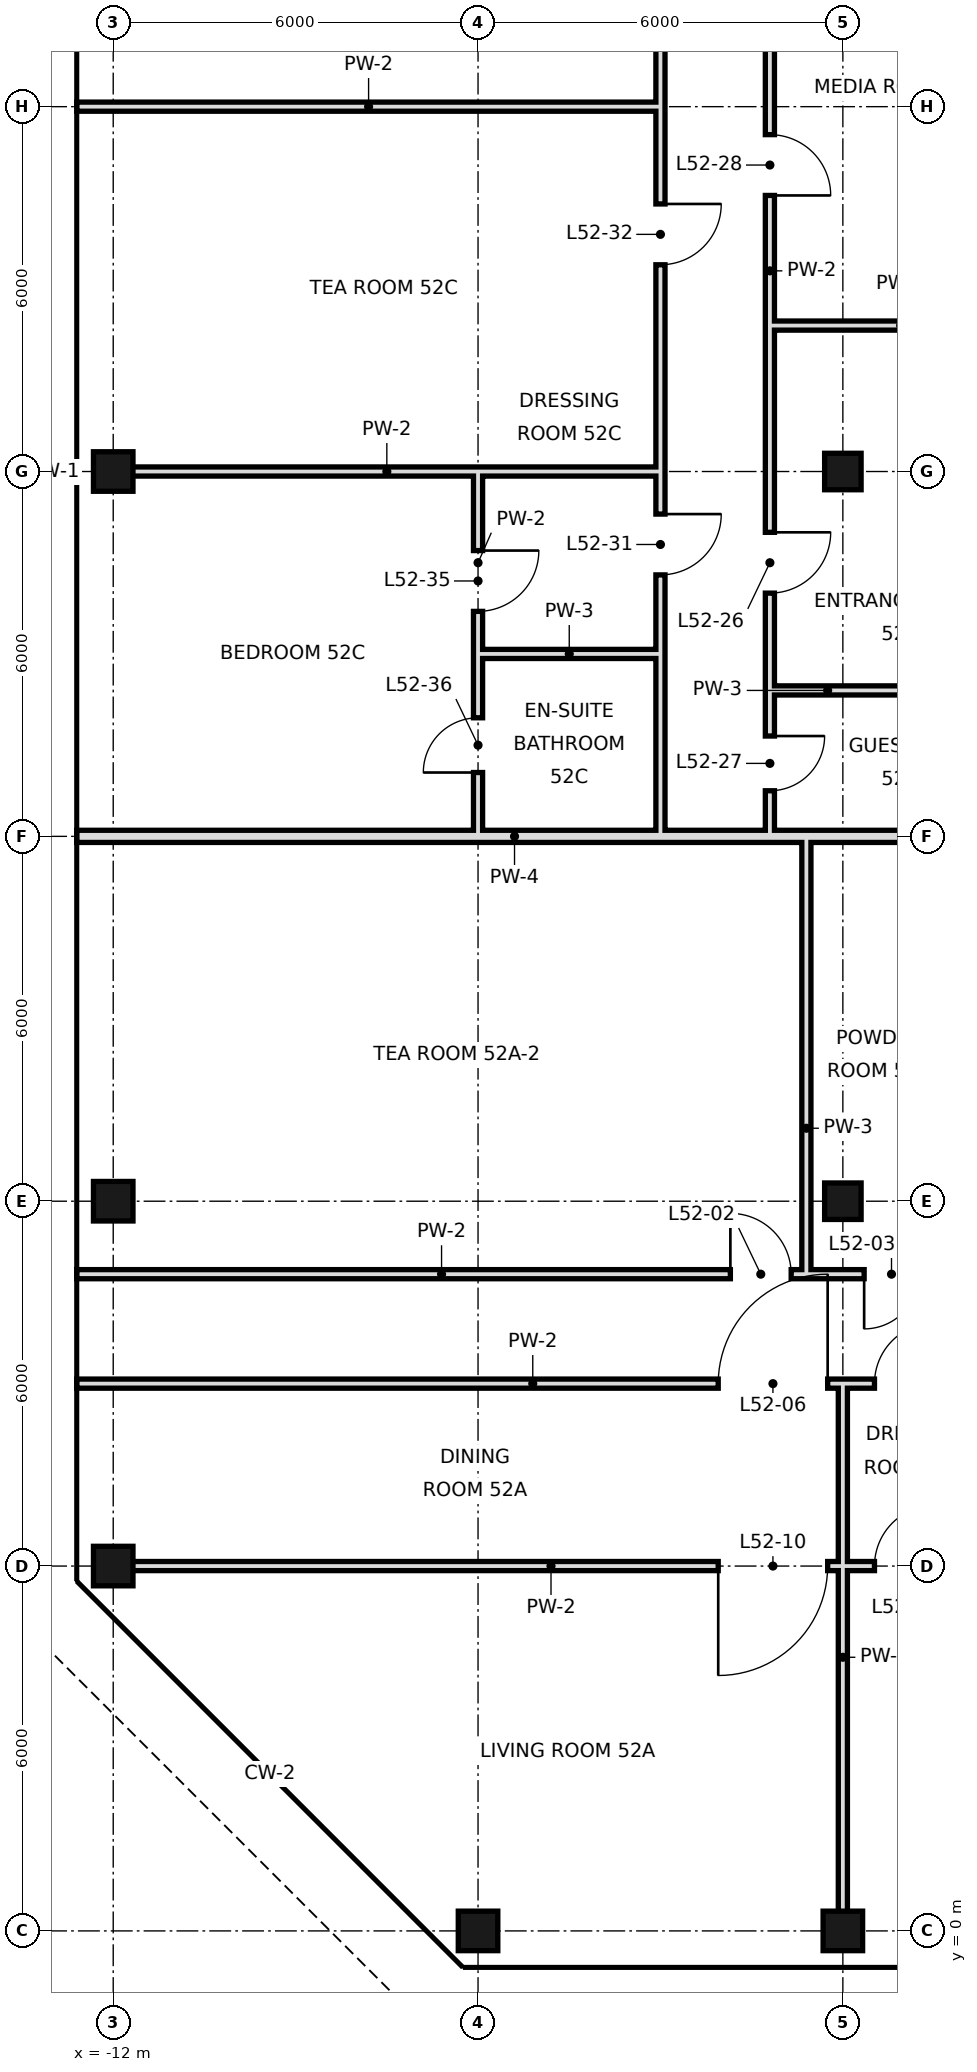
"""IFC4 building model, lengths in metres.
Left out: names, types, materials, properties, quantities, classifications, styles, units other than length and angle.
Written with IfcOpenShell. Run it as: python <this file> out.ifc"""

import sys

from ifc_helpers import new_model, si_unit, direction, frame, frame_2d, origin, origin_2d, place, context, subcontext, project, spatial, rectangle, hollow_rectangle, extrude, element, fill, save


model = new_model("IFC4")
c1 = context("Model", 3, precision=1e-05, world=origin(), true_north=direction((0.0, 1.0)))
c2 = subcontext(c1, "Body", "Model", "MODEL_VIEW")
j1 = project(units=[si_unit("LENGTHUNIT", "METRE"), si_unit("PLANEANGLEUNIT", "RADIAN")], contexts=[c1])
p1 = place(None, origin())
s1 = spatial("IfcSite", under=j1, at=p1, CompositionType="ELEMENT")
p2 = place(p1, origin())
s2 = spatial("IfcBuilding", under=s1, at=p2, CompositionType="ELEMENT")
p3 = place(p2, frame((0.0, 0.0, 222.6)))
s3 = spatial("IfcBuildingStorey", under=s2, at=p3, CompositionType="ELEMENT", Elevation=222.6)
for number, where, z_axis, x_axis in (
    (1, (-12.0, 6.0, 0.0), (0.0, 0.0, 1.0), (1.0, 0.0, 0.0)),
    (2, (-12.0, 12.0, 0.0), (0.0, 0.0, 1.0), (1.0, 0.0, 0.0)),
    (3, (-12.0, 24.0, 0.0), (0.0, 0.0, 1.0), (1.0, 0.0, 0.0)),
    (4, (-6.0, 0.0, 0.0), (0.0, 0.0, 1.0), (1.0, 0.0, 0.0)),
    (5, (0.0, 0.0, 0.0), (0.0, 0.0, 1.0), (1.0, 0.0, 0.0)),
):
    element("IfcColumn", number, at=place(p3, frame(where, z_axis=z_axis, x_axis=x_axis)), inside=s3, PredefinedType="COLUMN", context=c2, shape_type="SweptSolid", body=[
        extrude(hollow_rectangle(XDim=0.65, YDim=0.65, WallThickness=0.032, at=origin_2d()), origin(), (0.0, 0.0, 1.0), 3.6),
    ])
for number, where, z_axis, x_axis in (
    (6, (0.0, 12.0, 0.0), (0.0, 0.0, 1.0), (1.0, 0.0, 0.0)),
    (7, (0.0, 24.0, 0.0), (0.0, 0.0, 1.0), (1.0, 0.0, 0.0)),
):
    element("IfcColumn", number, at=place(p3, frame(where, z_axis=z_axis, x_axis=x_axis)), inside=s3, PredefinedType="COLUMN", context=c2, shape_type="SweptSolid", body=[
        extrude(hollow_rectangle(XDim=0.6, YDim=0.6, WallThickness=0.028, at=origin_2d()), origin(), (0.0, 0.0, 1.0), 3.6),
    ])
p4 = place(p3, frame((-0.6, 10.8, 0.0), z_axis=(0.0, 0.0, 1.0), x_axis=(0.0, 1.0, 0.0)))
e8 = element("IfcWall", 8, at=p4, inside=s3, PredefinedType="PARTITIONING", context=c2, shape_type="SweptSolid", body=[
    extrude(rectangle(XDim=7.2, YDim=0.15, at=frame_2d((3.6, 0.0))), origin(), (0.0, 0.0, 1.0), 3.42),
])
p5 = place(p3, frame((-1.2, 20.4, 0.0), z_axis=(0.0, 0.0, 1.0), x_axis=(0.0, 1.0, 0.0)))
e9 = element("IfcWall", 9, at=p5, inside=s3, PredefinedType="PARTITIONING", context=c2, shape_type="SweptSolid", body=[
    extrude(rectangle(XDim=13.8, YDim=0.15, at=frame_2d((6.9, 0.0))), origin(), (0.0, 0.0, 1.0), 3.42),
])
p6 = place(p5, frame((1.6, 0.0, 0.0)))
e10 = element("IfcOpeningElement", 10, at=p6, cuts=e9, PredefinedType="OPENING", context=c2, shape_type="SweptSolid", body=[
    extrude(rectangle(XDim=1.0, YDim=2.4, at=frame_2d((0.5, 1.2))), frame((0.0, 0.085, 0.0), z_axis=(0.0, -1.0, 0.0), x_axis=(1.0, 0.0, 0.0)), (0.0, 0.0, 1.0), 0.17),
])
p7 = place(p5, frame((8.14, 0.0, 0.0)))
e11 = element("IfcOpeningElement", 11, at=p7, cuts=e9, PredefinedType="OPENING", context=c2, shape_type="SweptSolid", body=[
    extrude(rectangle(XDim=1.0, YDim=2.4, at=frame_2d((0.5, 1.2))), frame((0.0, 0.085, 0.0), z_axis=(0.0, -1.0, 0.0), x_axis=(1.0, 0.0, 0.0)), (0.0, 0.0, 1.0), 0.17),
])
p8 = place(p3, frame((-1.2, 18.0, 0.0), z_axis=(0.0, 0.0, 1.0), x_axis=(0.0, 1.0, 0.0)))
e12 = element("IfcWall", 12, at=p8, inside=s3, PredefinedType="PARTITIONING", context=c2, shape_type="SweptSolid", body=[
    extrude(rectangle(XDim=2.4, YDim=0.15, at=frame_2d((1.2, 0.0))), origin(), (0.0, 0.0, 1.0), 3.42),
])
p9 = place(p8, frame((0.75, 0.0, 0.0)))
e13 = element("IfcOpeningElement", 13, at=p9, cuts=e12, PredefinedType="OPENING", context=c2, shape_type="SweptSolid", body=[
    extrude(rectangle(XDim=0.9, YDim=2.4, at=frame_2d((0.45, 1.2))), frame((0.0, 0.085, 0.0), z_axis=(0.0, -1.0, 0.0), x_axis=(1.0, 0.0, 0.0)), (0.0, 0.0, 1.0), 0.17),
])
p10 = place(p3, frame((-3.0, 21.0, 0.0), z_axis=(0.0, 0.0, 1.0), x_axis=(0.0, 1.0, 0.0)))
e14 = element("IfcWall", 14, at=p10, inside=s3, PredefinedType="PARTITIONING", context=c2, shape_type="SweptSolid", body=[
    extrude(rectangle(XDim=27.6, YDim=0.15, at=frame_2d((13.8, 0.0))), origin(), (0.0, 0.0, 1.0), 3.42),
])
p11 = place(p10, frame((1.3, 0.0, 0.0)))
e15 = element("IfcOpeningElement", 15, at=p11, cuts=e14, PredefinedType="OPENING", context=c2, shape_type="SweptSolid", body=[
    extrude(rectangle(XDim=1.0, YDim=2.4, at=frame_2d((0.5, 1.2))), frame((0.0, 0.085, 0.0), z_axis=(0.0, -1.0, 0.0), x_axis=(1.0, 0.0, 0.0)), (0.0, 0.0, 1.0), 0.17),
])
p12 = place(p10, frame((6.4, 0.0, 0.0)))
e16 = element("IfcOpeningElement", 16, at=p12, cuts=e14, PredefinedType="OPENING", context=c2, shape_type="SweptSolid", body=[
    extrude(rectangle(XDim=1.0, YDim=2.4, at=frame_2d((0.5, 1.2))), frame((0.0, 0.085, 0.0), z_axis=(0.0, -1.0, 0.0), x_axis=(1.0, 0.0, 0.0)), (0.0, 0.0, 1.0), 0.17),
])
p13 = place(p10, frame((12.4, 0.0, 0.0)))
e17 = element("IfcOpeningElement", 17, at=p13, cuts=e14, PredefinedType="OPENING", context=c2, shape_type="SweptSolid", body=[
    extrude(rectangle(XDim=1.0, YDim=2.4, at=frame_2d((0.5, 1.2))), frame((0.0, 0.085, 0.0), z_axis=(0.0, -1.0, 0.0), x_axis=(1.0, 0.0, 0.0)), (0.0, 0.0, 1.0), 0.17),
])
p14 = place(p10, frame((20.1, 0.0, 0.0)))
e18 = element("IfcOpeningElement", 18, at=p14, cuts=e14, PredefinedType="OPENING", context=c2, shape_type="SweptSolid", body=[
    extrude(rectangle(XDim=1.8, YDim=2.4, at=frame_2d((0.9, 1.2))), frame((0.0, 0.085, 0.0), z_axis=(0.0, -1.0, 0.0), x_axis=(1.0, 0.0, 0.0)), (0.0, 0.0, 1.0), 0.17),
])
p15 = place(p3, frame((-3.0, 18.0, 0.0), z_axis=(0.0, 0.0, 1.0), x_axis=(0.0, 1.0, 0.0)))
e19 = element("IfcWall", 19, at=p15, inside=s3, PredefinedType="PARTITIONING", context=c2, shape_type="SweptSolid", body=[
    extrude(rectangle(XDim=3.0, YDim=0.15, at=frame_2d((1.5, 0.0))), origin(), (0.0, 0.0, 1.0), 3.42),
])
p16 = place(p3, frame((-6.0, 21.0, 0.0), z_axis=(0.0, 0.0, 1.0), x_axis=(0.0, 1.0, 0.0)))
e20 = element("IfcWall", 20, at=p16, inside=s3, PredefinedType="PARTITIONING", context=c2, shape_type="SweptSolid", body=[
    extrude(rectangle(XDim=3.0, YDim=0.15, at=frame_2d((1.5, 0.0))), origin(), (0.0, 0.0, 1.0), 3.42),
])
p17 = place(p16, frame((0.7, 0.0, 0.0)))
e21 = element("IfcOpeningElement", 21, at=p17, cuts=e20, PredefinedType="OPENING", context=c2, shape_type="SweptSolid", body=[
    extrude(rectangle(XDim=1.0, YDim=2.4, at=frame_2d((0.5, 1.2))), frame((0.0, 0.085, 0.0), z_axis=(0.0, -1.0, 0.0), x_axis=(1.0, 0.0, 0.0)), (0.0, 0.0, 1.0), 0.17),
])
p18 = place(p3, frame((-6.0, 18.0, 0.0), z_axis=(0.0, 0.0, 1.0), x_axis=(0.0, 1.0, 0.0)))
e22 = element("IfcWall", 22, at=p18, inside=s3, PredefinedType="PARTITIONING", context=c2, shape_type="SweptSolid", body=[
    extrude(rectangle(XDim=3.0, YDim=0.15, at=frame_2d((1.5, 0.0))), origin(), (0.0, 0.0, 1.0), 3.42),
])
p19 = place(p18, frame((1.05, 0.0, 0.0)))
e23 = element("IfcOpeningElement", 23, at=p19, cuts=e22, PredefinedType="OPENING", context=c2, shape_type="SweptSolid", body=[
    extrude(rectangle(XDim=0.9, YDim=2.4, at=frame_2d((0.45, 1.2))), frame((0.0, 0.085, 0.0), z_axis=(0.0, -1.0, 0.0), x_axis=(1.0, 0.0, 0.0)), (0.0, 0.0, 1.0), 0.17),
])
p20 = place(p3, frame((0.0, 0.0, 0.0), z_axis=(0.0, 0.0, 1.0), x_axis=(0.0, 1.0, 0.0)))
e24 = element("IfcWall", 24, at=p20, inside=s3, PredefinedType="PARTITIONING", context=c2, shape_type="SweptSolid", body=[
    extrude(rectangle(XDim=9.0, YDim=0.15, at=frame_2d((4.5, 0.0))), origin(), (0.0, 0.0, 1.0), 2.72),
])
p21 = place(p3, frame((-12.6, 10.8, 0.0), z_axis=(0.0, 0.0, 1.0), x_axis=(1.0, 0.0, 0.0)))
e25 = element("IfcWall", 25, at=p21, inside=s3, PredefinedType="PARTITIONING", context=c2, shape_type="SweptSolid", body=[
    extrude(rectangle(XDim=12.0, YDim=0.15, at=frame_2d((6.0, 0.0))), origin(), (0.0, 0.0, 1.0), 3.42),
])
p22 = place(p21, frame((10.75, 0.0, 0.0)))
e26 = element("IfcOpeningElement", 26, at=p22, cuts=e25, PredefinedType="OPENING", context=c2, shape_type="SweptSolid", body=[
    extrude(rectangle(XDim=1.0, YDim=2.4, at=frame_2d((0.5, 1.2))), frame((0.0, 0.085, 0.0), z_axis=(0.0, -1.0, 0.0), x_axis=(1.0, 0.0, 0.0)), (0.0, 0.0, 1.0), 0.17),
])
p23 = place(p3, frame((-0.6, 10.8, 0.0), z_axis=(0.0, 0.0, 1.0), x_axis=(1.0, 0.0, 0.0)))
e27 = element("IfcWall", 27, at=p23, inside=s3, PredefinedType="PARTITIONING", context=c2, shape_type="SweptSolid", body=[
    extrude(rectangle(XDim=2.4, YDim=0.15, at=frame_2d((1.2, 0.0))), origin(), (0.0, 0.0, 1.0), 3.42),
])
p24 = place(p23, frame((0.95, 0.0, 0.0)))
e28 = element("IfcOpeningElement", 28, at=p24, cuts=e27, PredefinedType="OPENING", context=c2, shape_type="SweptSolid", body=[
    extrude(rectangle(XDim=0.9, YDim=2.4, at=frame_2d((0.45, 1.2))), frame((0.0, 0.085, 0.0), z_axis=(0.0, -1.0, 0.0), x_axis=(1.0, 0.0, 0.0)), (0.0, 0.0, 1.0), 0.17),
])
p25 = place(p3, frame((-12.6, 18.0, 0.0), z_axis=(0.0, 0.0, 1.0), x_axis=(1.0, 0.0, 0.0)))
e29 = element("IfcWall", 29, at=p25, inside=s3, PredefinedType="SOLIDWALL", context=c2, shape_type="SweptSolid", body=[
    extrude(rectangle(XDim=14.4, YDim=0.2, at=frame_2d((7.2, 0.0))), origin(), (0.0, 0.0, 1.0), 2.72),
])
p26 = place(p3, frame((-1.2, 20.4, 0.0), z_axis=(0.0, 0.0, 1.0), x_axis=(1.0, 0.0, 0.0)))
e30 = element("IfcWall", 30, at=p26, inside=s3, PredefinedType="PARTITIONING", context=c2, shape_type="SweptSolid", body=[
    extrude(rectangle(XDim=4.3, YDim=0.15, at=frame_2d((2.15, 0.0))), origin(), (0.0, 0.0, 1.0), 3.42),
])
p27 = place(p3, frame((-6.0, 21.0, 0.0), z_axis=(0.0, 0.0, 1.0), x_axis=(1.0, 0.0, 0.0)))
e31 = element("IfcWall", 31, at=p27, inside=s3, PredefinedType="PARTITIONING", context=c2, shape_type="SweptSolid", body=[
    extrude(rectangle(XDim=3.0, YDim=0.15, at=frame_2d((1.5, 0.0))), origin(), (0.0, 0.0, 1.0), 3.42),
])
p28 = place(p3, frame((-12.0, 24.0, 0.0), z_axis=(0.0, 0.0, 1.0), x_axis=(1.0, 0.0, 0.0)))
e32 = element("IfcWall", 32, at=p28, inside=s3, PredefinedType="PARTITIONING", context=c2, shape_type="SweptSolid", body=[
    extrude(rectangle(XDim=9.0, YDim=0.15, at=frame_2d((4.5, 0.0))), origin(), (0.0, 0.0, 1.0), 2.72),
])
p29 = place(p3, frame((-1.2, 26.4, 0.0), z_axis=(0.0, 0.0, 1.0), x_axis=(1.0, 0.0, 0.0)))
e33 = element("IfcWall", 33, at=p29, inside=s3, PredefinedType="PARTITIONING", context=c2, shape_type="SweptSolid", body=[
    extrude(rectangle(XDim=4.3, YDim=0.15, at=frame_2d((2.15, 0.0))), origin(), (0.0, 0.0, 1.0), 3.42),
])
p30 = place(p3, frame((-12.6, 30.0, 0.0), z_axis=(0.0, 0.0, 1.0), x_axis=(1.0, 0.0, 0.0)))
e34 = element("IfcWall", 34, at=p30, inside=s3, PredefinedType="PARTITIONING", context=c2, shape_type="SweptSolid", body=[
    extrude(rectangle(XDim=9.6, YDim=0.15, at=frame_2d((4.8, 0.0))), origin(), (0.0, 0.0, 1.0), 2.72),
])
p31 = place(p3, frame((-12.0, 6.0, 0.0), z_axis=(0.0, 0.0, 1.0), x_axis=(1.0, 0.0, 0.0)))
e35 = element("IfcWall", 35, at=p31, inside=s3, PredefinedType="PARTITIONING", context=c2, shape_type="SweptSolid", body=[
    extrude(rectangle(XDim=14.4, YDim=0.15, at=frame_2d((7.2, 0.0))), origin(), (0.0, 0.0, 1.0), 2.72),
])
p32 = place(p31, frame((9.95, 0.0, 0.0)))
e36 = element("IfcOpeningElement", 36, at=p32, cuts=e35, PredefinedType="OPENING", context=c2, shape_type="SweptSolid", body=[
    extrude(rectangle(XDim=1.8, YDim=2.4, at=frame_2d((0.9, 1.2))), frame((0.0, 0.085, 0.0), z_axis=(0.0, -1.0, 0.0), x_axis=(1.0, 0.0, 0.0)), (0.0, 0.0, 1.0), 0.17),
])
p33 = place(p31, frame((12.52, 0.0, 0.0)))
e37 = element("IfcOpeningElement", 37, at=p33, cuts=e35, PredefinedType="OPENING", context=c2, shape_type="SweptSolid", body=[
    extrude(rectangle(XDim=1.0, YDim=2.4, at=frame_2d((0.5, 1.2))), frame((0.0, 0.085, 0.0), z_axis=(0.0, -1.0, 0.0), x_axis=(1.0, 0.0, 0.0)), (0.0, 0.0, 1.0), 0.17),
])
p34 = place(p3, frame((-12.6, 9.0, 0.0), z_axis=(0.0, 0.0, 1.0), x_axis=(1.0, 0.0, 0.0)))
e38 = element("IfcWall", 38, at=p34, inside=s3, PredefinedType="PARTITIONING", context=c2, shape_type="SweptSolid", body=[
    extrude(rectangle(XDim=15.0, YDim=0.15, at=frame_2d((7.5, 0.0))), origin(), (0.0, 0.0, 1.0), 3.42),
])
p35 = place(p34, frame((10.55, 0.0, 0.0)))
e39 = element("IfcOpeningElement", 39, at=p35, cuts=e38, PredefinedType="OPENING", context=c2, shape_type="SweptSolid", body=[
    extrude(rectangle(XDim=1.8, YDim=2.4, at=frame_2d((0.9, 1.2))), frame((0.0, 0.085, 0.0), z_axis=(0.0, -1.0, 0.0), x_axis=(1.0, 0.0, 0.0)), (0.0, 0.0, 1.0), 0.17),
])
p36 = place(p34, frame((13.12, 0.0, 0.0)))
e40 = element("IfcOpeningElement", 40, at=p36, cuts=e38, PredefinedType="OPENING", context=c2, shape_type="SweptSolid", body=[
    extrude(rectangle(XDim=1.0, YDim=2.4, at=frame_2d((0.5, 1.2))), frame((0.0, 0.085, 0.0), z_axis=(0.0, -1.0, 0.0), x_axis=(1.0, 0.0, 0.0)), (0.0, 0.0, 1.0), 0.17),
])
p37 = place(p22, origin())
e41 = element("IfcDoor", 41, at=p37, inside=s3, OperationType="SINGLE_SWING_LEFT", PredefinedType="DOOR", context=c2, shape_type="SweptSolid", body=[
    extrude(rectangle(XDim=1.0, YDim=2.4, at=frame_2d((0.5, 1.2))), frame((0.0, 0.025, 0.0), z_axis=(0.0, -1.0, 0.0), x_axis=(1.0, 0.0, 0.0)), (0.0, 0.0, 1.0), 0.05),
])
fill(e26, e41)
p38 = place(p24, frame((0.9, 0.0, 0.0), z_axis=(0.0, 0.0, 1.0), x_axis=(-1.0, 0.0, 0.0)))
e42 = element("IfcDoor", 42, at=p38, inside=s3, OperationType="SINGLE_SWING_RIGHT", PredefinedType="DOOR", context=c2, shape_type="SweptSolid", body=[
    extrude(rectangle(XDim=0.9, YDim=2.4, at=frame_2d((0.45, 1.2))), frame((0.0, 0.025, 0.0), z_axis=(0.0, -1.0, 0.0), x_axis=(1.0, 0.0, 0.0)), (0.0, 0.0, 1.0), 0.05),
])
fill(e28, e42)
p39 = place(p35, frame((1.8, 0.0, 0.0), z_axis=(0.0, 0.0, 1.0), x_axis=(-1.0, 0.0, 0.0)))
e43 = element("IfcDoor", 43, at=p39, inside=s3, OperationType="SINGLE_SWING_LEFT", PredefinedType="DOOR", context=c2, shape_type="SweptSolid", body=[
    extrude(rectangle(XDim=1.8, YDim=2.4, at=frame_2d((0.9, 1.2))), frame((0.0, 0.025, 0.0), z_axis=(0.0, -1.0, 0.0), x_axis=(1.0, 0.0, 0.0)), (0.0, 0.0, 1.0), 0.05),
])
fill(e39, e43)
p40 = place(p36, frame((1.0, 0.0, 0.0), z_axis=(0.0, 0.0, 1.0), x_axis=(-1.0, 0.0, 0.0)))
e44 = element("IfcDoor", 44, at=p40, inside=s3, OperationType="SINGLE_SWING_LEFT", PredefinedType="DOOR", context=c2, shape_type="SweptSolid", body=[
    extrude(rectangle(XDim=1.0, YDim=2.4, at=frame_2d((0.5, 1.2))), frame((0.0, 0.025, 0.0), z_axis=(0.0, -1.0, 0.0), x_axis=(1.0, 0.0, 0.0)), (0.0, 0.0, 1.0), 0.05),
])
fill(e40, e44)
p41 = place(p32, frame((1.8, 0.0, 0.0), z_axis=(0.0, 0.0, 1.0), x_axis=(-1.0, 0.0, 0.0)))
e45 = element("IfcDoor", 45, at=p41, inside=s3, OperationType="SINGLE_SWING_RIGHT", PredefinedType="DOOR", context=c2, shape_type="SweptSolid", body=[
    extrude(rectangle(XDim=1.8, YDim=2.4, at=frame_2d((0.9, 1.2))), frame((0.0, 0.025, 0.0), z_axis=(0.0, -1.0, 0.0), x_axis=(1.0, 0.0, 0.0)), (0.0, 0.0, 1.0), 0.05),
])
fill(e36, e45)
p42 = place(p33, frame((1.0, 0.0, 0.0), z_axis=(0.0, 0.0, 1.0), x_axis=(-1.0, 0.0, 0.0)))
e46 = element("IfcDoor", 46, at=p42, inside=s3, OperationType="SINGLE_SWING_LEFT", PredefinedType="DOOR", context=c2, shape_type="SweptSolid", body=[
    extrude(rectangle(XDim=1.0, YDim=2.4, at=frame_2d((0.5, 1.2))), frame((0.0, 0.025, 0.0), z_axis=(0.0, -1.0, 0.0), x_axis=(1.0, 0.0, 0.0)), (0.0, 0.0, 1.0), 0.05),
])
fill(e37, e46)
p43 = place(p6, origin())
e47 = element("IfcDoor", 47, at=p43, inside=s3, OperationType="SINGLE_SWING_RIGHT", PredefinedType="DOOR", context=c2, shape_type="SweptSolid", body=[
    extrude(rectangle(XDim=1.0, YDim=2.4, at=frame_2d((0.5, 1.2))), frame((0.0, 0.025, 0.0), z_axis=(0.0, -1.0, 0.0), x_axis=(1.0, 0.0, 0.0)), (0.0, 0.0, 1.0), 0.05),
])
fill(e10, e47)
p44 = place(p9, origin())
e48 = element("IfcDoor", 48, at=p44, inside=s3, OperationType="SINGLE_SWING_RIGHT", PredefinedType="DOOR", context=c2, shape_type="SweptSolid", body=[
    extrude(rectangle(XDim=0.9, YDim=2.4, at=frame_2d((0.45, 1.2))), frame((0.0, 0.025, 0.0), z_axis=(0.0, -1.0, 0.0), x_axis=(1.0, 0.0, 0.0)), (0.0, 0.0, 1.0), 0.05),
])
fill(e13, e48)
p45 = place(p7, frame((1.0, 0.0, 0.0), z_axis=(0.0, 0.0, 1.0), x_axis=(-1.0, 0.0, 0.0)))
e49 = element("IfcDoor", 49, at=p45, inside=s3, OperationType="SINGLE_SWING_RIGHT", PredefinedType="DOOR", context=c2, shape_type="SweptSolid", body=[
    extrude(rectangle(XDim=1.0, YDim=2.4, at=frame_2d((0.5, 1.2))), frame((0.0, 0.025, 0.0), z_axis=(0.0, -1.0, 0.0), x_axis=(1.0, 0.0, 0.0)), (0.0, 0.0, 1.0), 0.05),
])
fill(e11, e49)
p46 = place(p11, origin())
e50 = element("IfcDoor", 50, at=p46, inside=s3, OperationType="SINGLE_SWING_RIGHT", PredefinedType="DOOR", context=c2, shape_type="SweptSolid", body=[
    extrude(rectangle(XDim=1.0, YDim=2.4, at=frame_2d((0.5, 1.2))), frame((0.0, 0.025, 0.0), z_axis=(0.0, -1.0, 0.0), x_axis=(1.0, 0.0, 0.0)), (0.0, 0.0, 1.0), 0.05),
])
fill(e15, e50)
p47 = place(p12, origin())
e51 = element("IfcDoor", 51, at=p47, inside=s3, OperationType="SINGLE_SWING_RIGHT", PredefinedType="DOOR", context=c2, shape_type="SweptSolid", body=[
    extrude(rectangle(XDim=1.0, YDim=2.4, at=frame_2d((0.5, 1.2))), frame((0.0, 0.025, 0.0), z_axis=(0.0, -1.0, 0.0), x_axis=(1.0, 0.0, 0.0)), (0.0, 0.0, 1.0), 0.05),
])
fill(e16, e51)
p48 = place(p17, origin())
e52 = element("IfcDoor", 52, at=p48, inside=s3, OperationType="SINGLE_SWING_RIGHT", PredefinedType="DOOR", context=c2, shape_type="SweptSolid", body=[
    extrude(rectangle(XDim=1.0, YDim=2.4, at=frame_2d((0.5, 1.2))), frame((0.0, 0.025, 0.0), z_axis=(0.0, -1.0, 0.0), x_axis=(1.0, 0.0, 0.0)), (0.0, 0.0, 1.0), 0.05),
])
fill(e21, e52)
p49 = place(p19, origin())
e53 = element("IfcDoor", 53, at=p49, inside=s3, OperationType="SINGLE_SWING_LEFT", PredefinedType="DOOR", context=c2, shape_type="SweptSolid", body=[
    extrude(rectangle(XDim=0.9, YDim=2.4, at=frame_2d((0.45, 1.2))), frame((0.0, 0.025, 0.0), z_axis=(0.0, -1.0, 0.0), x_axis=(1.0, 0.0, 0.0)), (0.0, 0.0, 1.0), 0.05),
])
fill(e23, e53)
save(model, sys.argv[1])
